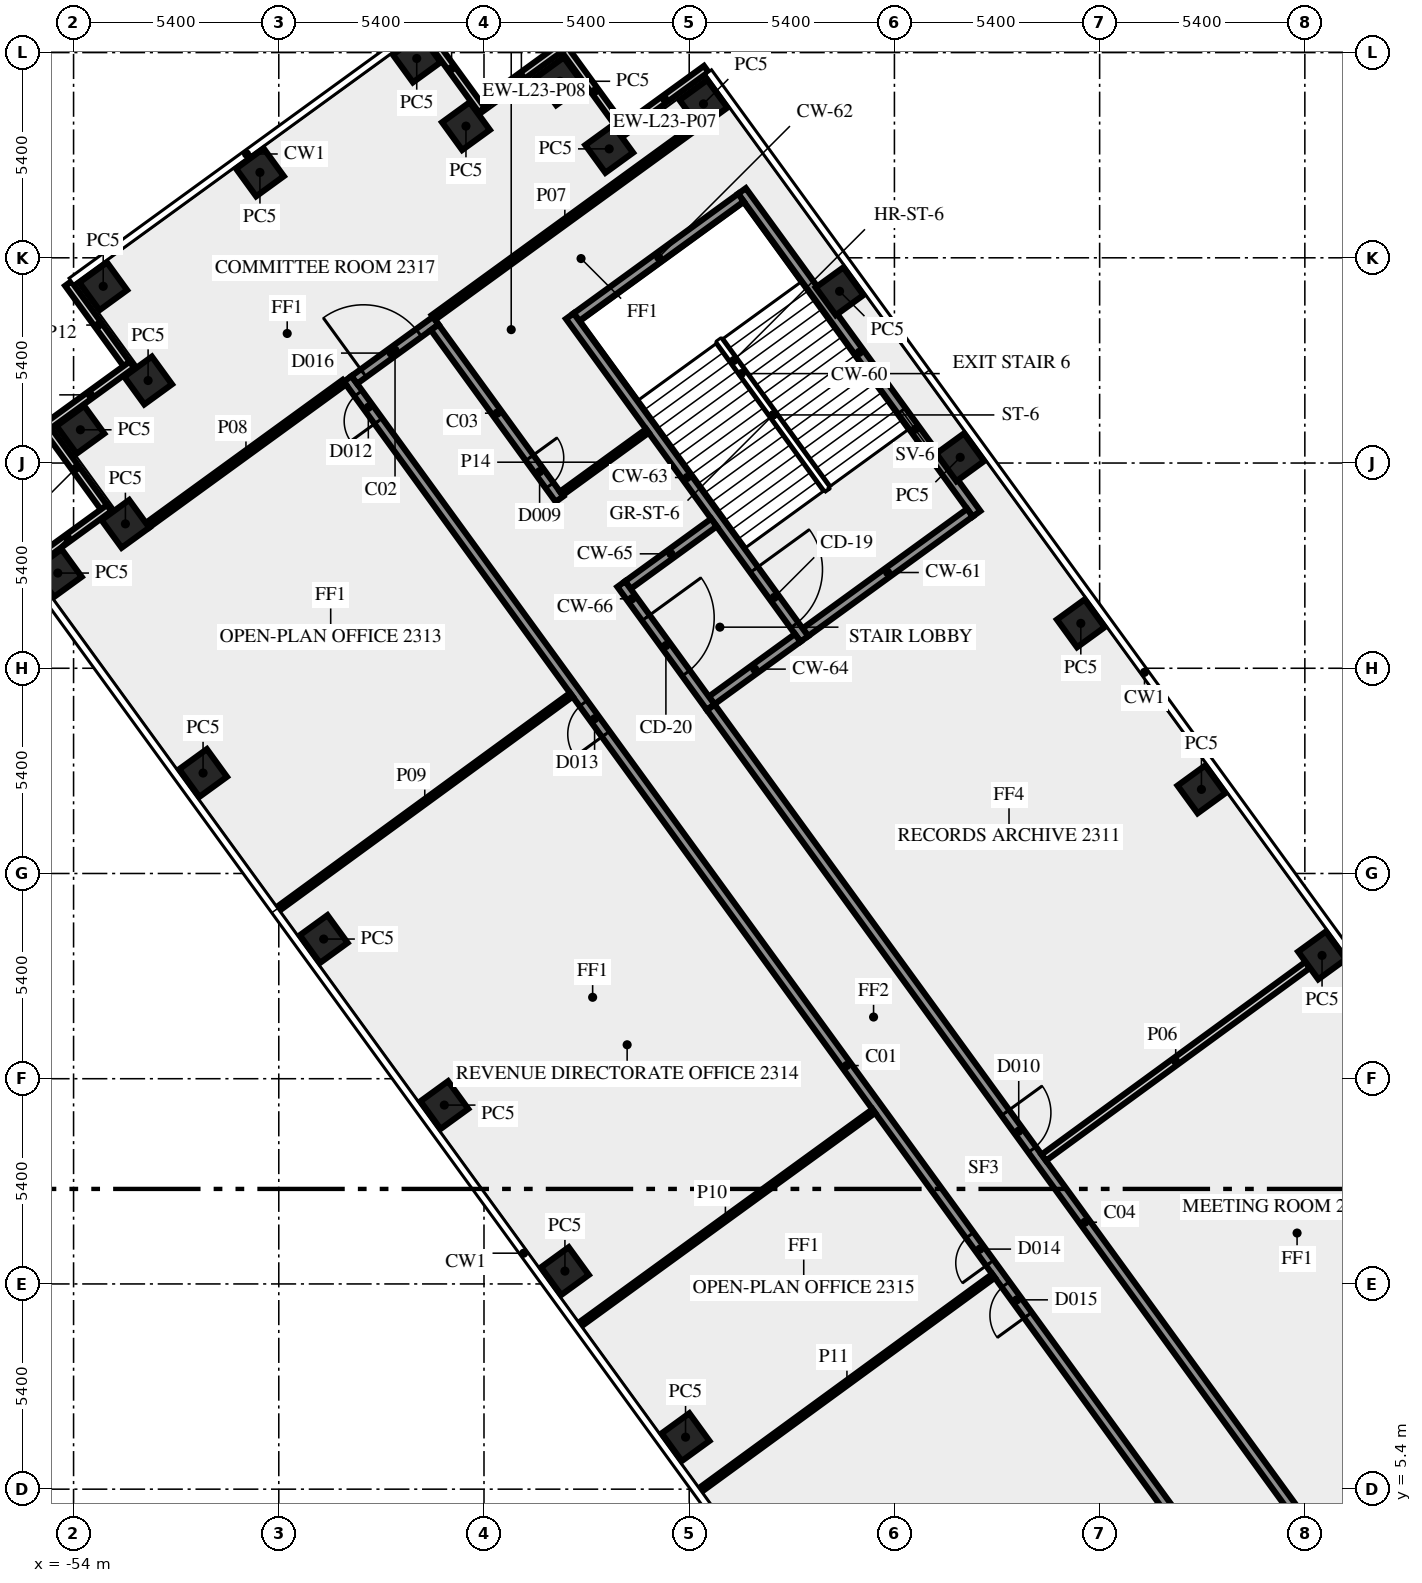
"""IFC4 building model, lengths in metres.
Left out: names, types, materials, properties, quantities, classifications, styles, units other than length and angle.
Written with IfcOpenShell. Run it as: python <this file> out.ifc"""

import sys

from ifc_helpers import new_model, si_unit, direction, frame, frame_2d, origin, origin_2d, place, context, subcontext, project, spatial, rectangle, extrude, element, fill, save


model = new_model("IFC4")
c1 = context("Model", 3, precision=1e-05, world=origin(), true_north=direction((0.0, 1.0)))
c2 = subcontext(c1, "Body", "Model", "MODEL_VIEW")
j1 = project(units=[si_unit("LENGTHUNIT", "METRE"), si_unit("PLANEANGLEUNIT", "RADIAN")], contexts=[c1])
p1 = place(None, origin())
s1 = spatial("IfcSite", under=j1, at=p1, CompositionType="ELEMENT")
p2 = place(p1, origin())
s2 = spatial("IfcBuilding", under=s1, at=p2, CompositionType="ELEMENT")
p3 = place(p2, frame((0.0, 0.0, 101.0)))
s3 = spatial("IfcBuildingStorey", under=s2, at=p3, CompositionType="ELEMENT", Elevation=101.0)
for number, where, z_axis, x_axis in (
    (1, (-21.147, 19.444, 0.0), (0.0, 0.0, 1.0), (-0.588, 0.809, 0.0)),
    (2, (-24.321, 23.812, 0.0), (0.0, 0.0, 1.0), (-0.588, 0.809, 0.0)),
    (3, (-27.495, 28.181, 0.0), (0.0, 0.0, 1.0), (-0.588, 0.809, 0.0)),
    (4, (-30.669, 32.55, 0.0), (0.0, 0.0, 1.0), (-0.588, 0.809, 0.0)),
    (5, (-33.843, 36.919, 0.0), (0.0, 0.0, 1.0), (-0.588, 0.809, 0.0)),
    (6, (-37.425, 41.85, 0.0), (0.0, 0.0, 1.0), (-0.588, 0.809, 0.0)),
    (7, (-39.906, 40.666, 0.0), (0.0, 0.0, 1.0), (-0.588, 0.809, 0.0)),
    (8, (-41.2, 42.445, 0.0), (0.0, 0.0, 1.0), (-0.588, 0.809, 0.0)),
    (9, (-43.675, 41.265, 0.0), (0.0, 0.0, 1.0), (-0.809, -0.588, 0.0)),
    (10, (-44.97, 43.045, 0.0), (0.0, 0.0, 1.0), (-0.809, -0.588, 0.0)),
    (11, (-49.096, 40.047, 0.0), (0.0, 0.0, 1.0), (-0.809, -0.588, 0.0)),
    (12, (-53.22, 37.05, 0.0), (0.0, 0.0, 1.0), (0.588, -0.809, 0.0)),
    (13, (-52.039, 34.571, 0.0), (0.0, 0.0, 1.0), (-0.809, -0.588, 0.0)),
    (14, (-53.82, 33.275, 0.0), (0.0, 0.0, 1.0), (0.588, -0.809, 0.0)),
    (15, (-52.636, 30.8, 0.0), (0.0, 0.0, 1.0), (-0.809, -0.588, 0.0)),
    (16, (-54.415, 29.505, 0.0), (0.0, 0.0, 1.0), (0.588, -0.809, 0.0)),
    (17, (-50.592, 24.243, 0.0), (0.0, 0.0, 1.0), (0.588, -0.809, 0.0)),
    (18, (-47.418, 19.875, 0.0), (0.0, 0.0, 1.0), (0.588, -0.809, 0.0)),
    (19, (-44.244, 15.506, 0.0), (0.0, 0.0, 1.0), (0.588, -0.809, 0.0)),
    (20, (-41.07, 11.137, 0.0), (0.0, 0.0, 1.0), (0.588, -0.809, 0.0)),
    (21, (-37.896, 6.769, 0.0), (0.0, 0.0, 1.0), (0.588, -0.809, 0.0)),
):
    element("IfcColumn", number, at=place(p3, frame(where, z_axis=z_axis, x_axis=x_axis)), inside=s3, PredefinedType="COLUMN", context=c2, shape_type="SweptSolid", body=[
        extrude(rectangle(XDim=0.9, YDim=0.9, at=origin_2d()), origin(), (0.0, 0.0, 1.0), 3.65),
    ])
p4 = place(p3, frame((-37.353, 42.768, 0.0), z_axis=(0.0, 0.0, 1.0), x_axis=(-0.809033161865, -0.587762999008, 0.0)))
e22 = element("IfcWall", 22, at=p4, inside=s3, PredefinedType="SOLIDWALL", context=c2, shape_type="SweptSolid", body=[
    extrude(rectangle(XDim=2.7, YDim=0.2, at=frame_2d((1.35, 0.0))), origin(), (0.0, 0.0, 1.0), 3.65),
])
p5 = place(p3, frame((-39.488, 41.094, 0.0), z_axis=(0.0, 0.0, 1.0), x_axis=(-0.587806000234, 0.809001919707, 0.0)))
e23 = element("IfcWall", 23, at=p5, inside=s3, PredefinedType="SOLIDWALL", context=c2, shape_type="SweptSolid", body=[
    extrude(rectangle(XDim=2.7, YDim=0.2, at=frame_2d((1.35, 0.0))), origin(), (0.0, 0.0, 1.0), 3.65),
])
for number, where, z_axis, x_axis in (
    (24, (-41.124, 43.366, 0.0), (0.0, 0.0, 1.0), (-0.809, -0.588, 0.0)),
    (25, (-43.259, 41.691, 0.0), (0.0, 0.0, 1.0), (-0.588, 0.809, 0.0)),
    (26, (-54.14, 37.123, 0.0), (0.0, 0.0, 1.0), (0.588, -0.809, 0.0)),
    (27, (-52.465, 34.987, 0.0), (0.0, 0.0, 1.0), (-0.809, -0.588, 0.0)),
):
    element("IfcWall", number, at=place(p3, frame(where, z_axis=z_axis, x_axis=x_axis)), inside=s3, PredefinedType="SOLIDWALL", context=c2, shape_type="SweptSolid", body=[
        extrude(rectangle(XDim=2.7, YDim=0.2, at=frame_2d((1.35, 0.0))), origin(), (0.0, 0.0, 1.0), 3.65),
    ])
p6 = place(p3, frame((-54.738, 33.351, 0.0), z_axis=(0.0, 0.0, 1.0), x_axis=(0.587779184282, -0.809021403008, 0.0)))
e28 = element("IfcWall", 28, at=p6, inside=s3, PredefinedType="SOLIDWALL", context=c2, shape_type="SweptSolid", body=[
    extrude(rectangle(XDim=2.7, YDim=0.2, at=frame_2d((1.35, 0.0))), origin(), (0.0, 0.0, 1.0), 3.65),
])
p7 = place(p3, frame((-53.063, 31.216, 0.0), z_axis=(0.0, 0.0, 1.0), x_axis=(-0.809033161865, -0.587762999008, 0.0)))
e29 = element("IfcWall", 29, at=p7, inside=s3, PredefinedType="SOLIDWALL", context=c2, shape_type="SweptSolid", body=[
    extrude(rectangle(XDim=2.7, YDim=0.2, at=frame_2d((1.35, 0.0))), origin(), (0.0, 0.0, 1.0), 3.65),
])
p8 = place(p3, frame((-30.24, 31.064, 0.0), z_axis=(0.0, 0.0, 1.0), x_axis=(-0.587795589702, 0.809009483706, 0.0)))
e30 = element("IfcWall", 30, at=p8, inside=s3, PredefinedType="SHEAR", context=c2, shape_type="SweptSolid", body=[
    extrude(rectangle(XDim=10.5, YDim=0.25, at=frame_2d((5.25, 0.0))), origin(), (0.0, 0.0, 1.0), 3.65),
])
p9 = place(p8, frame((2.15, 0.0, 1.0)))
e31 = element("IfcOpeningElement", 31, at=p9, cuts=e30, PredefinedType="OPENING", context=c2, shape_type="SweptSolid", body=[
    extrude(rectangle(XDim=1.2, YDim=1.2, at=frame_2d((0.6, 0.6))), frame((0.0, 0.135, 0.0), z_axis=(0.0, -1.0, 0.0), x_axis=(1.0, 0.0, 0.0)), (0.0, 0.0, 1.0), 0.27),
])
p10 = place(p3, frame((-30.414, 31.092, 0.0), z_axis=(0.0, 0.0, 1.0), x_axis=(-0.8089984606, -0.587810760999, 0.0)))
e32 = element("IfcWall", 32, at=p10, inside=s3, PredefinedType="SHEAR", context=c2, shape_type="SweptSolid", body=[
    extrude(rectangle(XDim=5.35, YDim=0.25, at=frame_2d((2.675, 0.0))), origin(), (0.0, 0.0, 1.0), 3.65),
])
p11 = place(p3, frame((-36.439, 39.384, 0.0), z_axis=(0.0, 0.0, 1.0), x_axis=(-0.809020161303, -0.587780893365, 0.0)))
e33 = element("IfcWall", 33, at=p11, inside=s3, PredefinedType="SHEAR", context=c2, shape_type="SweptSolid", body=[
    extrude(rectangle(XDim=5.35, YDim=0.25, at=frame_2d((2.675, 0.0))), origin(), (0.0, 0.0, 1.0), 3.65),
])
p12 = place(p3, frame((-40.942, 36.267, 0.0), z_axis=(0.0, 0.0, 1.0), x_axis=(0.587795589702, -0.809009483706, 0.0)))
e34 = element("IfcWall", 34, at=p12, inside=s3, PredefinedType="SHEAR", context=c2, shape_type="SweptSolid", body=[
    extrude(rectangle(XDim=10.5, YDim=0.25, at=frame_2d((5.25, 0.0))), origin(), (0.0, 0.0, 1.0), 3.65),
])
p13 = place(p12, frame((8.25, 0.0, 0.0)))
e35 = element("IfcOpeningElement", 35, at=p13, cuts=e34, PredefinedType="OPENING", context=c2, shape_type="SweptSolid", body=[
    extrude(rectangle(XDim=1.8, YDim=2.1, at=frame_2d((0.9, 1.05))), frame((0.0, 0.135, 0.0), z_axis=(0.0, -1.0, 0.0), x_axis=(1.0, 0.0, 0.0)), (0.0, 0.0, 1.0), 0.27),
])
for number, where, z_axis, x_axis in (
    (36, (-34.945, 27.8, 0.0), (0.0, 0.0, 1.0), (-0.809, -0.588, 0.0)),
    (37, (-37.149, 30.834, 0.0), (0.0, 0.0, 1.0), (-0.809, -0.588, 0.0)),
):
    element("IfcWall", number, at=place(p3, frame(where, z_axis=z_axis, x_axis=x_axis)), inside=s3, PredefinedType="SHEAR", context=c2, shape_type="SweptSolid", body=[
        extrude(rectangle(XDim=2.8, YDim=0.25, at=frame_2d((1.4, 0.0))), origin(), (0.0, 0.0, 1.0), 3.65),
    ])
p14 = place(p3, frame((-39.589, 29.216, 0.0), z_axis=(0.0, 0.0, 1.0), x_axis=(0.587772420479, -0.809026317077, 0.0)))
e38 = element("IfcWall", 38, at=p14, inside=s3, PredefinedType="SHEAR", context=c2, shape_type="SweptSolid", body=[
    extrude(rectangle(XDim=4.0, YDim=0.25, at=frame_2d((2.0, 0.0))), origin(), (0.0, 0.0, 1.0), 3.65),
])
p15 = place(p14, frame((1.1, 0.0, 0.0)))
e39 = element("IfcOpeningElement", 39, at=p15, cuts=e38, PredefinedType="OPENING", context=c2, shape_type="SweptSolid", body=[
    extrude(rectangle(XDim=1.8, YDim=2.1, at=frame_2d((0.9, 1.05))), frame((0.0, 0.135, 0.0), z_axis=(0.0, -1.0, 0.0), x_axis=(1.0, 0.0, 0.0)), (0.0, 0.0, 1.0), 0.27),
])
p16 = place(p3, frame((-20.531, -1.523, 0.0), z_axis=(0.0, 0.0, 1.0), x_axis=(-0.587784593204, 0.809017473231, 0.0)))
e40 = element("IfcWall", 40, at=p16, inside=s3, PredefinedType="SOLIDWALL", context=c2, shape_type="SweptSolid", body=[
    extrude(rectangle(XDim=44.67, YDim=0.25, at=frame_2d((22.335, 0.0))), origin(), (0.0, 0.0, 1.0), 3.65),
])
p17 = place(p16, frame((43.296, 0.0, 0.0)))
e41 = element("IfcOpeningElement", 41, at=p17, cuts=e40, PredefinedType="OPENING", context=c2, shape_type="SweptSolid", body=[
    extrude(rectangle(XDim=0.9, YDim=2.1, at=frame_2d((0.45, 1.05))), frame((0.0, 0.135, 0.0), z_axis=(0.0, -1.0, 0.0), x_axis=(1.0, 0.0, 0.0)), (0.0, 0.0, 1.0), 0.27),
])
p18 = place(p16, frame((15.916, 0.0, 0.0)))
e42 = element("IfcOpeningElement", 42, at=p18, cuts=e40, PredefinedType="OPENING", context=c2, shape_type="SweptSolid", body=[
    extrude(rectangle(XDim=0.9, YDim=2.1, at=frame_2d((0.45, 1.05))), frame((0.0, 0.135, 0.0), z_axis=(0.0, -1.0, 0.0), x_axis=(1.0, 0.0, 0.0)), (0.0, 0.0, 1.0), 0.27),
])
p19 = place(p16, frame((33.116, 0.0, 0.0)))
e43 = element("IfcOpeningElement", 43, at=p19, cuts=e40, PredefinedType="OPENING", context=c2, shape_type="SweptSolid", body=[
    extrude(rectangle(XDim=1.0, YDim=2.1, at=frame_2d((0.5, 1.05))), frame((0.0, 0.135, 0.0), z_axis=(0.0, -1.0, 0.0), x_axis=(1.0, 0.0, 0.0)), (0.0, 0.0, 1.0), 0.27),
])
p20 = place(p16, frame((14.216, 0.0, 0.0)))
e44 = element("IfcOpeningElement", 44, at=p20, cuts=e40, PredefinedType="OPENING", context=c2, shape_type="SweptSolid", body=[
    extrude(rectangle(XDim=1.0, YDim=2.1, at=frame_2d((0.5, 1.05))), frame((0.0, 0.135, 0.0), z_axis=(0.0, -1.0, 0.0), x_axis=(1.0, 0.0, 0.0)), (0.0, 0.0, 1.0), 0.27),
])
p21 = place(p3, frame((-46.613, 34.588, 0.0), z_axis=(0.0, 0.0, 1.0), x_axis=(0.808994936898, 0.587815610607, 0.0)))
e45 = element("IfcWall", 45, at=p21, inside=s3, PredefinedType="SOLIDWALL", context=c2, shape_type="SweptSolid", body=[
    extrude(rectangle(XDim=2.65, YDim=0.25, at=frame_2d((1.325, 0.0))), origin(), (0.0, 0.0, 1.0), 3.65),
])
p22 = place(p21, frame((0.299, 0.0, 0.0)))
e46 = element("IfcOpeningElement", 46, at=p22, cuts=e45, PredefinedType="OPENING", context=c2, shape_type="SweptSolid", body=[
    extrude(rectangle(XDim=1.8, YDim=2.1, at=frame_2d((0.9, 1.05))), frame((0.0, 0.135, 0.0), z_axis=(0.0, -1.0, 0.0), x_axis=(1.0, 0.0, 0.0)), (0.0, 0.0, 1.0), 0.27),
])
p23 = place(p3, frame((-44.497, 35.971, 0.0), z_axis=(0.0, 0.0, 1.0), x_axis=(0.587742866856, -0.809047787501, 0.0)))
e47 = element("IfcWall", 47, at=p23, inside=s3, PredefinedType="SOLIDWALL", context=c2, shape_type="SweptSolid", body=[
    extrude(rectangle(XDim=5.586, YDim=0.25, at=frame_2d((2.793, 0.0))), origin(), (0.0, 0.0, 1.0), 3.65),
])
p24 = place(p23, frame((4.245, 0.0, 0.0)))
e48 = element("IfcOpeningElement", 48, at=p24, cuts=e47, PredefinedType="OPENING", context=c2, shape_type="SweptSolid", body=[
    extrude(rectangle(XDim=0.9, YDim=2.1, at=frame_2d((0.45, 1.05))), frame((0.0, 0.135, 0.0), z_axis=(0.0, -1.0, 0.0), x_axis=(1.0, 0.0, 0.0)), (0.0, 0.0, 1.0), 0.27),
])
p25 = place(p3, frame((-37.232, 25.972, 0.0), z_axis=(0.0, 0.0, 1.0), x_axis=(0.587786323093, -0.809016216391, 0.0)))
e49 = element("IfcWall", 49, at=p25, inside=s3, PredefinedType="SOLIDWALL", context=c2, shape_type="SweptSolid", body=[
    extrude(rectangle(XDim=33.493, YDim=0.25, at=frame_2d((16.747, 0.0))), origin(), (0.0, 0.0, 1.0), 3.65),
])
p26 = place(p25, frame((13.185, 0.0, 0.0)))
e50 = element("IfcOpeningElement", 50, at=p26, cuts=e49, PredefinedType="OPENING", context=c2, shape_type="SweptSolid", body=[
    extrude(rectangle(XDim=1.2, YDim=2.1, at=frame_2d((0.6, 1.05))), frame((0.0, 0.135, 0.0), z_axis=(0.0, -1.0, 0.0), x_axis=(1.0, 0.0, 0.0)), (0.0, 0.0, 1.0), 0.27),
])
p27 = place(p25, frame((29.152, 0.0, 0.0)))
e51 = element("IfcOpeningElement", 51, at=p27, cuts=e49, PredefinedType="OPENING", context=c2, shape_type="SweptSolid", body=[
    extrude(rectangle(XDim=0.9, YDim=2.1, at=frame_2d((0.45, 1.05))), frame((0.0, 0.135, 0.0), z_axis=(0.0, -1.0, 0.0), x_axis=(1.0, 0.0, 0.0)), (0.0, 0.0, 1.0), 0.27),
])
p28 = place(p3, frame((-28.469, 14.124, 0.0), z_axis=(0.0, 0.0, 1.0), x_axis=(0.807597163234, 0.589734535139, 0.0)))
e52 = element("IfcWall", 52, at=p28, inside=s3, PredefinedType="SOLIDWALL", context=c2, shape_type="SweptSolid", body=[
    extrude(rectangle(XDim=8.595, YDim=0.2, at=frame_2d((4.298, 0.0))), origin(), (0.0, 0.0, 1.0), 3.65),
])
p29 = place(p3, frame((-37.614, 41.257, 0.0), z_axis=(0.0, 0.0, 1.0), x_axis=(-0.808991595707, -0.587820208972, 0.0)))
e53 = element("IfcWall", 53, at=p29, inside=s3, PredefinedType="PARTITIONING", context=c2, shape_type="SweptSolid", body=[
    extrude(rectangle(XDim=8.551, YDim=0.15, at=frame_2d((4.275, 0.0))), origin(), (0.0, 0.0, 1.0), 3.65),
])
p30 = place(p3, frame((-46.877, 34.526, 0.0), z_axis=(0.0, 0.0, 1.0), x_axis=(-0.808993566199, -0.587817497059, 0.0)))
e54 = element("IfcWall", 54, at=p30, inside=s3, PredefinedType="PARTITIONING", context=c2, shape_type="SweptSolid", body=[
    extrude(rectangle(XDim=6.395, YDim=0.15, at=frame_2d((3.197, 0.0))), origin(), (0.0, 0.0, 1.0), 3.65),
])
p31 = place(p3, frame((-48.615, 20.671, 0.0), z_axis=(0.0, 0.0, 1.0), x_axis=(0.807691251741, 0.589605666408, 0.0)))
e55 = element("IfcWall", 55, at=p31, inside=s3, PredefinedType="PARTITIONING", context=c2, shape_type="SweptSolid", body=[
    extrude(rectangle(XDim=9.55, YDim=0.12, at=frame_2d((4.775, 0.0))), origin(), (0.0, 0.0, 1.0), 2.75),
])
p32 = place(p3, frame((-32.943, 15.349, 0.0), z_axis=(0.0, 0.0, 1.0), x_axis=(-0.80903787798, -0.587756507402, 0.0)))
e56 = element("IfcWall", 56, at=p32, inside=s3, PredefinedType="PARTITIONING", context=c2, shape_type="SweptSolid", body=[
    extrude(rectangle(XDim=9.652, YDim=0.12, at=frame_2d((4.826, 0.0))), origin(), (0.0, 0.0, 1.0), 2.75),
])
p33 = place(p3, frame((-37.506, 5.381, 0.0), z_axis=(0.0, 0.0, 1.0), x_axis=(0.807645841498, 0.589667868135, 0.0)))
e57 = element("IfcWall", 57, at=p33, inside=s3, PredefinedType="PARTITIONING", context=c2, shape_type="SweptSolid", body=[
    extrude(rectangle(XDim=9.551, YDim=0.12, at=frame_2d((4.775, 0.0))), origin(), (0.0, 0.0, 1.0), 2.75),
])
p34 = place(p3, frame((-41.166, 31.599, 0.0), z_axis=(0.0, 0.0, 1.0), x_axis=(0.809090262332, 0.587684394381, 0.0)))
e58 = element("IfcWall", 58, at=p34, inside=s3, PredefinedType="PARTITIONING", context=c2, shape_type="SweptSolid", body=[
    extrude(rectangle(XDim=2.801, YDim=0.12, at=frame_2d((1.4, 0.0))), origin(), (0.0, 0.0, 1.0), 3.65),
])
p35 = place(p9, origin())
e59 = element("IfcWindow", 59, at=p35, inside=s3, PartitioningType="SINGLE_PANEL", PredefinedType="WINDOW", context=c2, shape_type="SweptSolid", body=[
    extrude(rectangle(XDim=1.2, YDim=1.2, at=frame_2d((0.6, 0.6))), frame((0.0, 0.03, 0.0), z_axis=(0.0, -1.0, 0.0), x_axis=(1.0, 0.0, 0.0)), (0.0, 0.0, 1.0), 0.06),
])
fill(e31, e59)
p36 = place(p13, origin())
e60 = element("IfcDoor", 60, at=p36, inside=s3, OperationType="DOUBLE_DOOR_SINGLE_SWING", PredefinedType="DOOR", context=c2, shape_type="SweptSolid", body=[
    extrude(rectangle(XDim=1.8, YDim=2.1, at=frame_2d((0.9, 1.05))), frame((0.0, 0.025, 0.0), z_axis=(0.0, -1.0, 0.0), x_axis=(1.0, 0.0, 0.0)), (0.0, 0.0, 1.0), 0.05),
])
fill(e35, e60)
p37 = place(p15, origin())
e61 = element("IfcDoor", 61, at=p37, inside=s3, OperationType="DOUBLE_DOOR_SINGLE_SWING", PredefinedType="DOOR", context=c2, shape_type="SweptSolid", body=[
    extrude(rectangle(XDim=1.8, YDim=2.1, at=frame_2d((0.9, 1.05))), frame((0.0, 0.025, 0.0), z_axis=(0.0, -1.0, 0.0), x_axis=(1.0, 0.0, 0.0)), (0.0, 0.0, 1.0), 0.05),
])
fill(e39, e61)
p38 = place(p26, origin())
e62 = element("IfcDoor", 62, at=p38, inside=s3, OperationType="SINGLE_SWING_RIGHT", PredefinedType="DOOR", context=c2, shape_type="SweptSolid", body=[
    extrude(rectangle(XDim=1.2, YDim=2.1, at=frame_2d((0.6, 1.05))), frame((0.0, 0.025, 0.0), z_axis=(0.0, -1.0, 0.0), x_axis=(1.0, 0.0, 0.0)), (0.0, 0.0, 1.0), 0.05),
])
fill(e50, e62)
p39 = place(p24, origin())
e63 = element("IfcDoor", 63, at=p39, inside=s3, OperationType="SINGLE_SWING_RIGHT", PredefinedType="DOOR", context=c2, shape_type="SweptSolid", body=[
    extrude(rectangle(XDim=0.9, YDim=2.1, at=frame_2d((0.45, 1.05))), frame((0.0, 0.025, 0.0), z_axis=(0.0, -1.0, 0.0), x_axis=(1.0, 0.0, 0.0)), (0.0, 0.0, 1.0), 0.05),
])
fill(e48, e63)
p40 = place(p17, origin())
e64 = element("IfcDoor", 64, at=p40, inside=s3, OperationType="SINGLE_SWING_RIGHT", PredefinedType="DOOR", context=c2, shape_type="SweptSolid", body=[
    extrude(rectangle(XDim=0.9, YDim=2.1, at=frame_2d((0.45, 1.05))), frame((0.0, 0.025, 0.0), z_axis=(0.0, -1.0, 0.0), x_axis=(1.0, 0.0, 0.0)), (0.0, 0.0, 1.0), 0.05),
])
fill(e41, e64)
p41 = place(p18, origin())
e65 = element("IfcDoor", 65, at=p41, inside=s3, OperationType="SINGLE_SWING_LEFT", PredefinedType="DOOR", context=c2, shape_type="SweptSolid", body=[
    extrude(rectangle(XDim=0.9, YDim=2.1, at=frame_2d((0.45, 1.05))), frame((0.0, 0.025, 0.0), z_axis=(0.0, -1.0, 0.0), x_axis=(1.0, 0.0, 0.0)), (0.0, 0.0, 1.0), 0.05),
])
fill(e42, e65)
p42 = place(p22, origin())
e66 = element("IfcDoor", 66, at=p42, inside=s3, OperationType="DOUBLE_DOOR_SINGLE_SWING", PredefinedType="DOOR", context=c2, shape_type="SweptSolid", body=[
    extrude(rectangle(XDim=1.8, YDim=2.1, at=frame_2d((0.9, 1.05))), frame((0.0, 0.025, 0.0), z_axis=(0.0, -1.0, 0.0), x_axis=(1.0, 0.0, 0.0)), (0.0, 0.0, 1.0), 0.05),
])
fill(e46, e66)
p43 = place(p19, origin())
e67 = element("IfcDoor", 67, at=p43, inside=s3, OperationType="SINGLE_SWING_RIGHT", PredefinedType="DOOR", context=c2, shape_type="SweptSolid", body=[
    extrude(rectangle(XDim=1.0, YDim=2.1, at=frame_2d((0.5, 1.05))), frame((0.0, 0.025, 0.0), z_axis=(0.0, -1.0, 0.0), x_axis=(1.0, 0.0, 0.0)), (0.0, 0.0, 1.0), 0.05),
])
fill(e43, e67)
p44 = place(p20, origin())
e68 = element("IfcDoor", 68, at=p44, inside=s3, OperationType="SINGLE_SWING_RIGHT", PredefinedType="DOOR", context=c2, shape_type="SweptSolid", body=[
    extrude(rectangle(XDim=1.0, YDim=2.1, at=frame_2d((0.5, 1.05))), frame((0.0, 0.025, 0.0), z_axis=(0.0, -1.0, 0.0), x_axis=(1.0, 0.0, 0.0)), (0.0, 0.0, 1.0), 0.05),
])
fill(e44, e68)
save(model, sys.argv[1])
